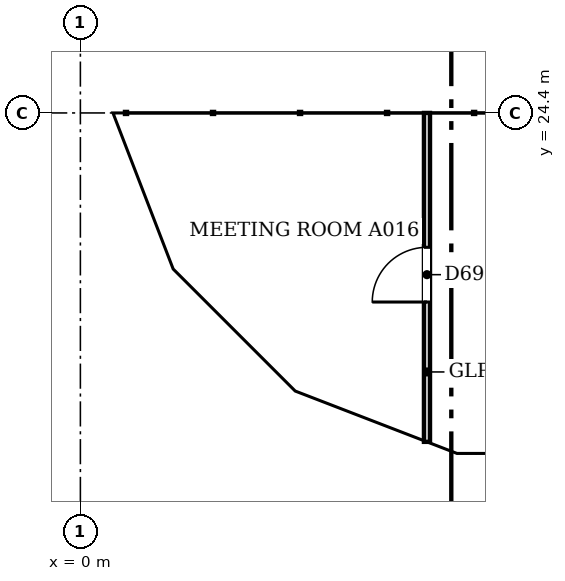
"""IFC4 building model, lengths in metres.
Left out: names, types, materials, properties, quantities, classifications, styles, units other than length and angle.
Written with IfcOpenShell. Run it as: python <this file> out.ifc"""

import sys

from ifc_helpers import new_model, si_unit, direction, frame, frame_2d, origin, place, context, subcontext, project, spatial, polyline, rectangle, outline, extrude, faceted_brep, source, transform, mapped, element, fill, save


model = new_model("IFC4")
c1 = context("Model", 3, precision=1e-05, world=origin(), true_north=direction((0.0, 1.0)))
c2 = subcontext(c1, "Body", "Model", "MODEL_VIEW")
j1 = project(units=[si_unit("LENGTHUNIT", "METRE"), si_unit("PLANEANGLEUNIT", "RADIAN")], contexts=[c1])
p1 = place(None, origin())
s1 = spatial("IfcSite", under=j1, at=p1, CompositionType="ELEMENT")
p2 = place(p1, origin())
s2 = spatial("IfcBuilding", under=s1, at=p2, CompositionType="ELEMENT")
p3 = place(p2, frame((0.0, 0.0, 33.4)))
s3 = spatial("IfcBuildingStorey", under=s2, at=p3, CompositionType="ELEMENT", Elevation=33.4)
m1 = source(origin(), c2, "Body", "Brep", [
    faceted_brep([(3.05, -0.25, 0.0), (6.053, -0.25, 3.8), (3.05, -0.25, 7.6), (0.0, -0.25, 3.8), (0.0, 0.25, 3.8), (3.05, 0.25, 7.6), (6.007, 0.25, 3.859), (6.007, 0.25, 3.741), (3.05, 0.25, 0.0), (6.053, 0.0, 3.8)], [[[0, 1, 2, 3]], [[4, 5, 6, 7, 8]], [[8, 7, 9, 1, 0]], [[6, 5, 2, 1, 9]], [[5, 4, 3, 2]], [[4, 8, 0, 3]], [[9, 7, 6]]]),
])
p4 = place(p3, frame((0.25, 30.5, -3.8), z_axis=(0.0, 0.0, 1.0), x_axis=(0.0, -1.0, 0.0)))
e1 = element("IfcWall", 1, at=p4, inside=s3, PredefinedType="SOLIDWALL", context=c2, shape_type="MappedRepresentation", body=[
    mapped(m1, transform((0.0, 0.0, 0.0), scale=1.0)),
])
m2 = source(origin(), c2, "Body", "SweptSolid", [
    extrude(outline(polyline([(3.049, 0.401), (5.735, 3.8), (3.049, 7.199), (0.321, 3.8), (3.049, 0.401)])), frame((0.0, 0.26, 0.0), z_axis=(0.0, -1.0, 0.0), x_axis=(1.0, 0.0, 0.0)), (0.0, 0.0, 1.0), 0.52),
])
p5 = place(p4, origin())
e2 = element("IfcOpeningElement", 2, at=p5, cuts=e1, PredefinedType="OPENING", context=c2, shape_type="MappedRepresentation", body=[
    mapped(m2, transform((0.0, 0.0, 0.0), scale=1.0)),
])
m3 = source(origin(), c2, "Body", "Brep", [
    faceted_brep([(2.95, -0.25, 0.0), (3.003, -0.25, 0.068), (3.003, -0.25, 7.531), (2.95, -0.25, 7.6), (0.0, -0.25, 3.8), (0.047, 0.25, 3.86), (2.898, 0.25, 7.532), (2.898, 0.25, 0.068), (0.047, 0.25, 3.74), (2.95, 0.0, 0.0), (2.95, 0.0, 7.6), (0.0, 0.0, 3.8)], [[[0, 1, 2, 3, 4]], [[5, 6, 7, 8]], [[1, 0, 9]], [[10, 3, 2]], [[6, 5, 11, 4, 3, 10]], [[8, 7, 9, 0, 4, 11]], [[8, 11, 5]], [[1, 9, 7, 6, 10, 2]]]),
])
p6 = place(p3, frame((0.25, 24.447, -3.8), z_axis=(0.0, 0.0, 1.0), x_axis=(0.35992665181, -0.932980602862, 0.0)))
e3 = element("IfcWall", 3, at=p6, inside=s3, PredefinedType="SOLIDWALL", context=c2, shape_type="MappedRepresentation", body=[
    mapped(m3, transform((0.0, 0.0, 0.0), scale=1.0)),
])
m4 = source(origin(), c2, "Body", "SweptSolid", [
    extrude(outline(polyline([(2.75, 6.935), (0.316, 3.8), (2.75, 0.665), (2.75, 6.935)])), frame((0.0, 0.26, 0.0), z_axis=(0.0, -1.0, 0.0), x_axis=(1.0, 0.0, 0.0)), (0.0, 0.0, 1.0), 0.52),
])
p7 = place(p6, origin())
e4 = element("IfcOpeningElement", 4, at=p7, cuts=e3, PredefinedType="OPENING", context=c2, shape_type="MappedRepresentation", body=[
    mapped(m4, transform((0.0, 0.0, 0.0), scale=1.0)),
])
m5 = source(origin(), c2, "Body", "Brep", [
    faceted_brep([(0.053, -0.25, 0.0), (2.997, -0.25, 3.8), (0.053, -0.25, 7.6), (0.0, -0.25, 7.532), (0.0, -0.25, 0.068), (0.106, 0.25, 7.531), (2.944, 0.25, 3.868), (2.944, 0.25, 3.732), (0.106, 0.25, 0.068), (2.997, 0.0, 3.8), (0.053, 0.0, 0.0), (0.053, 0.0, 7.6)], [[[0, 1, 2, 3, 4]], [[5, 6, 7, 8]], [[8, 7, 9, 1, 0, 10]], [[6, 5, 11, 2, 1, 9]], [[3, 2, 11]], [[10, 0, 4]], [[8, 10, 4, 3, 11, 5]], [[9, 7, 6]]]),
])
p8 = place(p3, frame((1.274, 21.731, -3.8), z_axis=(0.0, 0.0, 1.0), x_axis=(0.707147509625, -0.707066050402, 0.0)))
e5 = element("IfcWall", 5, at=p8, inside=s3, PredefinedType="SOLIDWALL", context=c2, shape_type="MappedRepresentation", body=[
    mapped(m5, transform((0.0, 0.0, 0.0), scale=1.0)),
])
m6 = source(origin(), c2, "Body", "SweptSolid", [
    extrude(outline(polyline([(0.253, 0.666), (2.681, 3.8), (0.253, 6.934), (0.253, 0.666)])), frame((0.0, 0.26, 0.0), z_axis=(0.0, -1.0, 0.0), x_axis=(1.0, 0.0, 0.0)), (0.0, 0.0, 1.0), 0.52),
])
p9 = place(p8, origin())
e6 = element("IfcOpeningElement", 6, at=p9, cuts=e5, PredefinedType="OPENING", context=c2, shape_type="MappedRepresentation", body=[
    mapped(m6, transform((0.0, 0.0, 0.0), scale=1.0)),
])
m7 = source(origin(), c2, "Body", "Brep", [
    faceted_brep([(2.95, -0.25, 0.0), (2.997, -0.25, 0.059), (2.997, -0.25, 7.541), (2.95, -0.25, 7.6), (0.0, -0.25, 3.8), (0.053, 0.25, 3.868), (2.904, 0.25, 7.54), (2.904, 0.25, 0.06), (0.053, 0.25, 3.732), (2.95, 0.0, 0.0), (2.95, 0.0, 7.6), (0.0, 0.0, 3.8)], [[[0, 1, 2, 3, 4]], [[5, 6, 7, 8]], [[1, 0, 9]], [[10, 3, 2]], [[6, 5, 11, 4, 3, 10]], [[8, 7, 9, 0, 4, 11]], [[8, 11, 5]], [[1, 9, 7, 6, 10, 2]]]),
])
p10 = place(p3, frame((3.394, 19.612, -3.8), z_axis=(0.0, 0.0, 1.0), x_axis=(0.932990326376, -0.359901446078, 0.0)))
e7 = element("IfcWall", 7, at=p10, inside=s3, PredefinedType="SOLIDWALL", context=c2, shape_type="MappedRepresentation", body=[
    mapped(m7, transform((0.0, 0.0, 0.0), scale=1.0)),
])
p11 = place(p10, origin())
e8 = element("IfcOpeningElement", 8, at=p11, cuts=e7, PredefinedType="OPENING", context=c2, shape_type="MappedRepresentation", body=[
    mapped(m4, transform((0.0, 0.0, 0.0), scale=1.0)),
])
m8 = source(origin(), c2, "Body", "Brep", [
    faceted_brep([(0.047, -0.25, 0.0), (3.05, -0.25, 3.8), (0.047, -0.25, 7.6), (0.0, -0.25, 7.54), (0.0, -0.25, 0.06), (0.093, 0.25, 7.541), (3.05, 0.25, 3.8), (0.093, 0.25, 0.059), (0.047, 0.0, 0.0), (0.047, 0.0, 7.6)], [[[0, 1, 2, 3, 4]], [[5, 6, 7]], [[7, 6, 1, 0, 8]], [[6, 5, 9, 2, 1]], [[3, 2, 9]], [[8, 0, 4]], [[7, 8, 4, 3, 9, 5]]]),
])
p12 = place(p3, frame((6.1, 18.55, -3.8), z_axis=(0.0, 0.0, 1.0), x_axis=(1.0, 0.0, 0.0)))
e9 = element("IfcWall", 9, at=p12, inside=s3, PredefinedType="SOLIDWALL", context=c2, shape_type="MappedRepresentation", body=[
    mapped(m8, transform((0.0, 0.0, 0.0), scale=1.0)),
])
m9 = source(origin(), c2, "Body", "SweptSolid", [
    extrude(outline(polyline([(0.247, 0.656), (2.731, 3.8), (0.247, 6.944), (0.247, 0.656)])), frame((0.0, 0.26, 0.0), z_axis=(0.0, -1.0, 0.0), x_axis=(1.0, 0.0, 0.0)), (0.0, 0.0, 1.0), 0.52),
])
p13 = place(p12, origin())
e10 = element("IfcOpeningElement", 10, at=p13, cuts=e9, PredefinedType="OPENING", context=c2, shape_type="MappedRepresentation", body=[
    mapped(m9, transform((0.0, 0.0, 0.0), scale=1.0)),
])
p14 = place(p2, frame((0.0, 0.0, 37.2)))
s4 = spatial("IfcBuildingStorey", under=s2, at=p14, CompositionType="ELEMENT", Elevation=37.2)
m10 = source(origin(), c2, "Body", "Brep", [
    faceted_brep([(3.003, -0.25, 0.0), (3.05, -0.25, 0.06), (3.05, -0.25, 7.54), (3.003, -0.25, 7.6), (0.0, -0.25, 3.8), (0.0, 0.25, 3.8), (2.957, 0.25, 7.541), (2.957, 0.25, 0.059), (3.003, 0.0, 0.0), (3.003, 0.0, 7.6)], [[[0, 1, 2, 3, 4]], [[5, 6, 7]], [[1, 0, 8]], [[9, 3, 2]], [[6, 5, 4, 3, 9]], [[5, 7, 8, 0, 4]], [[1, 8, 7, 6, 9, 2]]]),
])
p15 = place(p14, frame((0.25, 27.45, -3.8), z_axis=(0.0, 0.0, 1.0), x_axis=(0.0, -1.0, 0.0)))
e11 = element("IfcWall", 11, at=p15, inside=s4, PredefinedType="SOLIDWALL", context=c2, shape_type="MappedRepresentation", body=[
    mapped(m10, transform((0.0, 0.0, 0.0), scale=1.0)),
])
m11 = source(origin(), c2, "Body", "SweptSolid", [
    extrude(outline(polyline([(2.803, 6.944), (0.319, 3.8), (2.803, 0.656), (2.803, 6.944)])), frame((0.0, 0.26, 0.0), z_axis=(0.0, -1.0, 0.0), x_axis=(1.0, 0.0, 0.0)), (0.0, 0.0, 1.0), 0.52),
])
p16 = place(p15, origin())
e12 = element("IfcOpeningElement", 12, at=p16, cuts=e11, PredefinedType="OPENING", context=c2, shape_type="MappedRepresentation", body=[
    mapped(m11, transform((0.0, 0.0, 0.0), scale=1.0)),
])
m12 = source(origin(), c2, "Body", "Brep", [
    faceted_brep([(0.047, -0.25, 0.0), (2.997, -0.25, 3.8), (0.047, -0.25, 7.6), (0.0, -0.25, 7.541), (0.0, -0.25, 0.059), (0.093, 0.25, 7.54), (2.944, 0.25, 3.868), (2.944, 0.25, 3.732), (0.093, 0.25, 0.06), (2.997, 0.0, 3.8), (0.047, 0.0, 0.0), (0.047, 0.0, 7.6)], [[[0, 1, 2, 3, 4]], [[5, 6, 7, 8]], [[8, 7, 9, 1, 0, 10]], [[6, 5, 11, 2, 1, 9]], [[3, 2, 11]], [[10, 0, 4]], [[8, 10, 4, 3, 11, 5]], [[9, 7, 6]]]),
])
p17 = place(p14, frame((0.233, 24.49, -3.8), z_axis=(0.0, 0.0, 1.0), x_axis=(0.359901446078, -0.932990326376, 0.0)))
e13 = element("IfcWall", 13, at=p17, inside=s4, PredefinedType="SOLIDWALL", context=c2, shape_type="MappedRepresentation", body=[
    mapped(m12, transform((0.0, 0.0, 0.0), scale=1.0)),
])
m13 = source(origin(), c2, "Body", "SweptSolid", [
    extrude(outline(polyline([(0.247, 0.665), (2.681, 3.8), (0.247, 6.935), (0.247, 0.665)])), frame((0.0, 0.26, 0.0), z_axis=(0.0, -1.0, 0.0), x_axis=(1.0, 0.0, 0.0)), (0.0, 0.0, 1.0), 0.52),
])
p18 = place(p17, origin())
e14 = element("IfcOpeningElement", 14, at=p18, cuts=e13, PredefinedType="OPENING", context=c2, shape_type="MappedRepresentation", body=[
    mapped(m13, transform((0.0, 0.0, 0.0), scale=1.0)),
])
m14 = source(origin(), c2, "Body", "Brep", [
    faceted_brep([(2.944, -0.25, 0.0), (2.997, -0.25, 0.068), (2.997, -0.25, 7.532), (2.944, -0.25, 7.6), (0.0, -0.25, 3.8), (0.053, 0.25, 3.868), (2.891, 0.25, 7.532), (2.891, 0.25, 0.068), (0.053, 0.25, 3.732), (2.944, 0.0, 0.0), (2.944, 0.0, 7.6), (0.0, 0.0, 3.8)], [[[0, 1, 2, 3, 4]], [[5, 6, 7, 8]], [[1, 0, 9]], [[10, 3, 2]], [[6, 5, 11, 4, 3, 10]], [[8, 7, 9, 0, 4, 11]], [[8, 11, 5]], [[1, 9, 7, 6, 10, 2]]]),
])
p19 = place(p14, frame((1.312, 21.694, -3.8), z_axis=(0.0, 0.0, 1.0), x_axis=(0.707066050402, -0.707147509625, 0.0)))
e15 = element("IfcWall", 15, at=p19, inside=s4, PredefinedType="SOLIDWALL", context=c2, shape_type="MappedRepresentation", body=[
    mapped(m14, transform((0.0, 0.0, 0.0), scale=1.0)),
])
m15 = source(origin(), c2, "Body", "SweptSolid", [
    extrude(outline(polyline([(2.744, 6.934), (0.316, 3.8), (2.744, 0.667), (2.744, 6.934)])), frame((0.0, 0.26, 0.0), z_axis=(0.0, -1.0, 0.0), x_axis=(1.0, 0.0, 0.0)), (0.0, 0.0, 1.0), 0.52),
])
p20 = place(p19, origin())
e16 = element("IfcOpeningElement", 16, at=p20, cuts=e15, PredefinedType="OPENING", context=c2, shape_type="MappedRepresentation", body=[
    mapped(m15, transform((0.0, 0.0, 0.0), scale=1.0)),
])
m16 = source(origin(), c2, "Body", "Brep", [
    faceted_brep([(0.053, -0.25, 0.0), (3.003, -0.25, 3.8), (0.053, -0.25, 7.6), (0.0, -0.25, 7.532), (0.0, -0.25, 0.068), (0.106, 0.25, 7.532), (2.957, 0.25, 3.86), (2.957, 0.25, 3.74), (0.106, 0.25, 0.068), (3.003, 0.0, 3.8), (0.053, 0.0, 0.0), (0.053, 0.0, 7.6)], [[[0, 1, 2, 3, 4]], [[5, 6, 7, 8]], [[8, 7, 9, 1, 0, 10]], [[6, 5, 11, 2, 1, 9]], [[3, 2, 11]], [[10, 0, 4]], [[8, 10, 4, 3, 11, 5]], [[9, 7, 6]]]),
])
p21 = place(p14, frame((3.344, 19.631, -3.8), z_axis=(0.0, 0.0, 1.0), x_axis=(0.933007896601, -0.359855894603, 0.0)))
e17 = element("IfcWall", 17, at=p21, inside=s4, PredefinedType="SOLIDWALL", context=c2, shape_type="MappedRepresentation", body=[
    mapped(m16, transform((0.0, 0.0, 0.0), scale=1.0)),
])
m17 = source(origin(), c2, "Body", "SweptSolid", [
    extrude(outline(polyline([(0.253, 0.665), (2.687, 3.8), (0.253, 6.935), (0.253, 0.665)])), frame((0.0, 0.26, 0.0), z_axis=(0.0, -1.0, 0.0), x_axis=(1.0, 0.0, 0.0)), (0.0, 0.0, 1.0), 0.52),
])
p22 = place(p21, origin())
e18 = element("IfcOpeningElement", 18, at=p22, cuts=e17, PredefinedType="OPENING", context=c2, shape_type="MappedRepresentation", body=[
    mapped(m17, transform((0.0, 0.0, 0.0), scale=1.0)),
])
m18 = source(origin(), c2, "Body", "Brep", [
    faceted_brep([(3.003, -0.25, 0.0), (6.053, -0.25, 3.8), (3.003, -0.25, 7.6), (0.0, -0.25, 3.8), (0.047, 0.25, 3.859), (3.003, 0.25, 7.6), (6.053, 0.25, 3.8), (3.003, 0.25, 0.0), (0.047, 0.25, 3.741), (0.0, 0.0, 3.8)], [[[0, 1, 2, 3]], [[4, 5, 6, 7, 8]], [[7, 6, 1, 0]], [[6, 5, 2, 1]], [[5, 4, 9, 3, 2]], [[8, 7, 0, 3, 9]], [[8, 9, 4]]]),
])
p23 = place(p14, frame((6.146, 18.55, -3.8), z_axis=(0.0, 0.0, 1.0), x_axis=(1.0, 0.0, 0.0)))
e19 = element("IfcWall", 19, at=p23, inside=s4, PredefinedType="SOLIDWALL", context=c2, shape_type="MappedRepresentation", body=[
    mapped(m18, transform((0.0, 0.0, 0.0), scale=1.0)),
])
m19 = source(origin(), c2, "Body", "SweptSolid", [
    extrude(outline(polyline([(3.005, 0.401), (5.733, 3.8), (3.005, 7.199), (0.319, 3.8), (3.005, 0.401)])), frame((0.0, 0.26, 0.0), z_axis=(0.0, -1.0, 0.0), x_axis=(1.0, 0.0, 0.0)), (0.0, 0.0, 1.0), 0.52),
])
p24 = place(p23, origin())
e20 = element("IfcOpeningElement", 20, at=p24, cuts=e19, PredefinedType="OPENING", context=c2, shape_type="MappedRepresentation", body=[
    mapped(m19, transform((0.0, 0.0, 0.0), scale=1.0)),
])
p25 = place(p3, frame((5.7, 18.99, 0.0), z_axis=(0.0, 0.0, 1.0), x_axis=(0.0, 1.0, 0.0)))
e21 = element("IfcWall", 21, at=p25, inside=s3, PredefinedType="PARTITIONING", context=c2, shape_type="SweptSolid", body=[
    extrude(rectangle(XDim=5.41, YDim=0.1, at=frame_2d((2.705, 0.0))), origin(), (0.0, 0.0, 1.0), 3.067),
])
m20 = source(origin(), c2, "Body", "SweptSolid", [
    extrude(rectangle(XDim=0.9, YDim=2.1, at=frame_2d((0.45, 1.05))), frame((0.0, 0.06, 0.0), z_axis=(0.0, -1.0, 0.0), x_axis=(1.0, 0.0, 0.0)), (0.0, 0.0, 1.0), 0.12),
])
p26 = place(p25, frame((2.3, 0.0, 0.0)))
e22 = element("IfcOpeningElement", 22, at=p26, cuts=e21, PredefinedType="OPENING", context=c2, shape_type="MappedRepresentation", body=[
    mapped(m20, transform((0.0, 0.0, 0.0), scale=1.0)),
])
m21 = source(origin(), c2, "Body", "SweptSolid", [
    extrude(rectangle(XDim=0.9, YDim=2.1, at=frame_2d((0.45, 1.05))), frame((0.0, 0.025, 0.0), z_axis=(0.0, -1.0, 0.0), x_axis=(1.0, 0.0, 0.0)), (0.0, 0.0, 1.0), 0.05),
])
p27 = place(p26, origin())
e23 = element("IfcDoor", 23, at=p27, inside=s3, OperationType="SINGLE_SWING_LEFT", PredefinedType="DOOR", context=c2, shape_type="MappedRepresentation", body=[
    mapped(m21, transform((0.0, 0.0, 0.0), scale=1.0)),
])
fill(e22, e23)
save(model, sys.argv[1])
